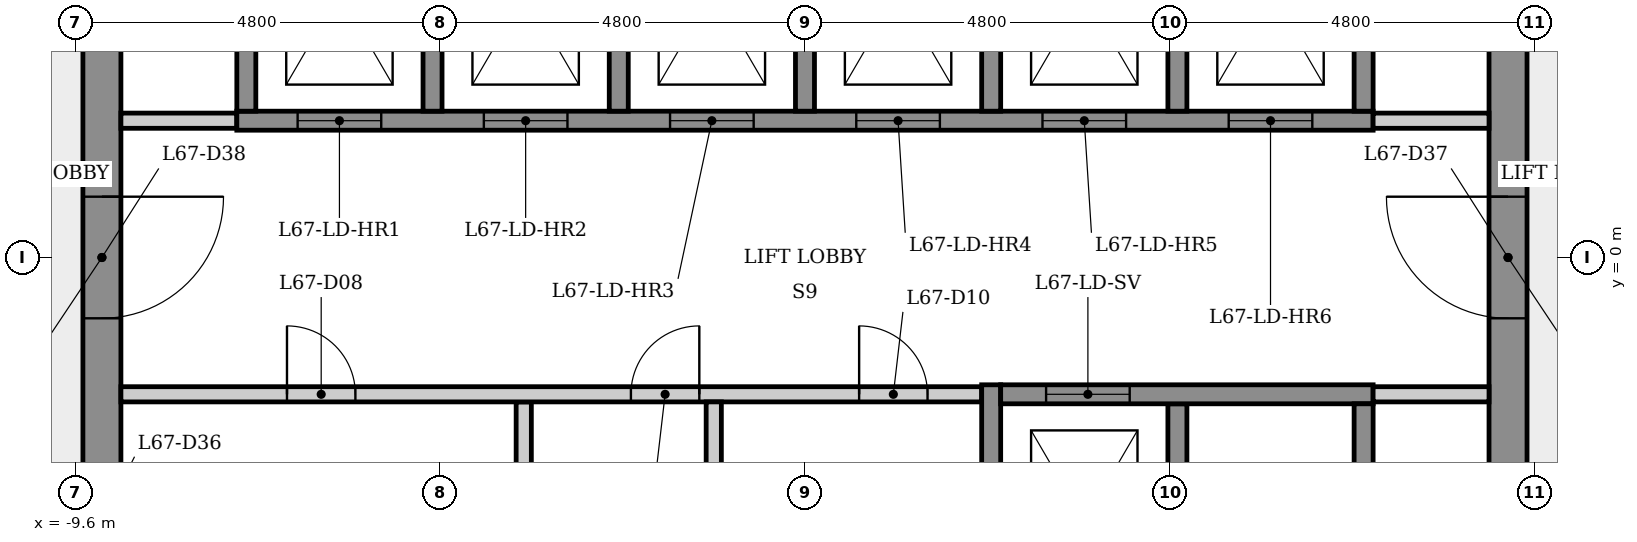
"""IFC4 building model, lengths in metres.
Left out: names, types, materials, properties, quantities, classifications, styles, units other than length and angle.
Written with IfcOpenShell. Run it as: python <this file> out.ifc"""

import sys

from ifc_helpers import new_model, si_unit, direction, frame, frame_2d, origin, place, context, subcontext, project, spatial, rectangle, extrude, element, fill, save


model = new_model("IFC4")
c1 = context("Model", 3, precision=1e-05, world=origin(), true_north=direction((0.0, 1.0)))
c2 = subcontext(c1, "Body", "Model", "MODEL_VIEW")
j1 = project(units=[si_unit("LENGTHUNIT", "METRE"), si_unit("PLANEANGLEUNIT", "RADIAN")], contexts=[c1])
p1 = place(None, origin())
s1 = spatial("IfcSite", under=j1, at=p1, CompositionType="ELEMENT")
p2 = place(p1, origin())
s2 = spatial("IfcBuilding", under=s1, at=p2, CompositionType="ELEMENT")
p3 = place(p2, frame((0.0, 0.0, 249.5)))
s3 = spatial("IfcBuildingStorey", under=s2, at=p3, CompositionType="ELEMENT", Elevation=249.5)
p4 = place(p3, frame((9.25, -5.485, 0.0), z_axis=(0.0, 0.0, 1.0), x_axis=(0.0, 1.0, 0.0)))
e1 = element("IfcWall", 1, at=p4, inside=s3, PredefinedType="SHEAR", context=c2, shape_type="SweptSolid", body=[
    extrude(rectangle(XDim=10.97, YDim=0.5, at=frame_2d((5.485, 0.0))), origin(), (0.0, 0.0, 1.0), 3.4),
])
p5 = place(p4, frame((4.685, 0.0, 0.0)))
e2 = element("IfcOpeningElement", 2, at=p5, cuts=e1, PredefinedType="OPENING", context=c2, shape_type="SweptSolid", body=[
    extrude(rectangle(XDim=1.6, YDim=2.1, at=frame_2d((0.8, 1.05))), frame((0.0, 0.26, 0.0), z_axis=(0.0, -1.0, 0.0), x_axis=(1.0, 0.0, 0.0)), (0.0, 0.0, 1.0), 0.52),
])
p6 = place(p3, frame((-9.25, 5.485, 0.0), z_axis=(0.0, 0.0, 1.0), x_axis=(0.0, -1.0, 0.0)))
e3 = element("IfcWall", 3, at=p6, inside=s3, PredefinedType="SHEAR", context=c2, shape_type="SweptSolid", body=[
    extrude(rectangle(XDim=10.97, YDim=0.5, at=frame_2d((5.485, 0.0))), origin(), (0.0, 0.0, 1.0), 3.4),
])
p7 = place(p6, frame((8.51, 0.0, 0.0)))
e4 = element("IfcOpeningElement", 4, at=p7, cuts=e3, PredefinedType="OPENING", context=c2, shape_type="SweptSolid", body=[
    extrude(rectangle(XDim=0.9, YDim=2.1, at=frame_2d((0.45, 1.05))), frame((0.0, 0.26, 0.0), z_axis=(0.0, -1.0, 0.0), x_axis=(1.0, 0.0, 0.0)), (0.0, 0.0, 1.0), 0.52),
])
p8 = place(p6, frame((4.685, 0.0, 0.0)))
e5 = element("IfcOpeningElement", 5, at=p8, cuts=e3, PredefinedType="OPENING", context=c2, shape_type="SweptSolid", body=[
    extrude(rectangle(XDim=1.6, YDim=2.1, at=frame_2d((0.8, 1.05))), frame((0.0, 0.26, 0.0), z_axis=(0.0, -1.0, 0.0), x_axis=(1.0, 0.0, 0.0)), (0.0, 0.0, 1.0), 0.52),
])
p9 = place(p3, frame((-9.0, 1.8, 0.0), z_axis=(0.0, 0.0, 1.0), x_axis=(1.0, 0.0, 0.0)))
e6 = element("IfcWall", 6, at=p9, inside=s3, PredefinedType="PARTITIONING", context=c2, shape_type="SweptSolid", body=[
    extrude(rectangle(XDim=1.525, YDim=0.2, at=frame_2d((0.763, 0.0))), origin(), (0.0, 0.0, 1.0), 3.0),
])
p10 = place(p3, frame((-7.475, 1.8, 0.0), z_axis=(0.0, 0.0, 1.0), x_axis=(1.0, 0.0, 0.0)))
e7 = element("IfcWall", 7, at=p10, inside=s3, PredefinedType="SHEAR", context=c2, shape_type="SweptSolid", body=[
    extrude(rectangle(XDim=14.95, YDim=0.25, at=frame_2d((7.475, 0.0))), origin(), (0.0, 0.0, 1.0), 3.0),
])
p11 = place(p10, frame((0.8, 0.0, 0.0)))
e8 = element("IfcOpeningElement", 8, at=p11, cuts=e7, PredefinedType="OPENING", context=c2, shape_type="SweptSolid", body=[
    extrude(rectangle(XDim=1.1, YDim=2.1, at=frame_2d((0.55, 1.05))), frame((0.0, 0.135, 0.0), z_axis=(0.0, -1.0, 0.0), x_axis=(1.0, 0.0, 0.0)), (0.0, 0.0, 1.0), 0.27),
])
p12 = place(p10, frame((3.25, 0.0, 0.0)))
e9 = element("IfcOpeningElement", 9, at=p12, cuts=e7, PredefinedType="OPENING", context=c2, shape_type="SweptSolid", body=[
    extrude(rectangle(XDim=1.1, YDim=2.1, at=frame_2d((0.55, 1.05))), frame((0.0, 0.135, 0.0), z_axis=(0.0, -1.0, 0.0), x_axis=(1.0, 0.0, 0.0)), (0.0, 0.0, 1.0), 0.27),
])
p13 = place(p10, frame((5.7, 0.0, 0.0)))
e10 = element("IfcOpeningElement", 10, at=p13, cuts=e7, PredefinedType="OPENING", context=c2, shape_type="SweptSolid", body=[
    extrude(rectangle(XDim=1.1, YDim=2.1, at=frame_2d((0.55, 1.05))), frame((0.0, 0.135, 0.0), z_axis=(0.0, -1.0, 0.0), x_axis=(1.0, 0.0, 0.0)), (0.0, 0.0, 1.0), 0.27),
])
p14 = place(p10, frame((8.15, 0.0, 0.0)))
e11 = element("IfcOpeningElement", 11, at=p14, cuts=e7, PredefinedType="OPENING", context=c2, shape_type="SweptSolid", body=[
    extrude(rectangle(XDim=1.1, YDim=2.1, at=frame_2d((0.55, 1.05))), frame((0.0, 0.135, 0.0), z_axis=(0.0, -1.0, 0.0), x_axis=(1.0, 0.0, 0.0)), (0.0, 0.0, 1.0), 0.27),
])
p15 = place(p10, frame((10.6, 0.0, 0.0)))
e12 = element("IfcOpeningElement", 12, at=p15, cuts=e7, PredefinedType="OPENING", context=c2, shape_type="SweptSolid", body=[
    extrude(rectangle(XDim=1.1, YDim=2.1, at=frame_2d((0.55, 1.05))), frame((0.0, 0.135, 0.0), z_axis=(0.0, -1.0, 0.0), x_axis=(1.0, 0.0, 0.0)), (0.0, 0.0, 1.0), 0.27),
])
p16 = place(p10, frame((13.05, 0.0, 0.0)))
e13 = element("IfcOpeningElement", 13, at=p16, cuts=e7, PredefinedType="OPENING", context=c2, shape_type="SweptSolid", body=[
    extrude(rectangle(XDim=1.1, YDim=2.1, at=frame_2d((0.55, 1.05))), frame((0.0, 0.135, 0.0), z_axis=(0.0, -1.0, 0.0), x_axis=(1.0, 0.0, 0.0)), (0.0, 0.0, 1.0), 0.27),
])
p17 = place(p3, frame((-7.35, 1.925, 0.0), z_axis=(0.0, 0.0, 1.0), x_axis=(0.0, 1.0, 0.0)))
e14 = element("IfcWall", 14, at=p17, inside=s3, PredefinedType="SHEAR", context=c2, shape_type="SweptSolid", body=[
    extrude(rectangle(XDim=3.35, YDim=0.25, at=frame_2d((1.675, 0.0))), origin(), (0.0, 0.0, 1.0), 3.0),
])
p18 = place(p3, frame((-4.9, 5.025, 0.0), z_axis=(0.0, 0.0, 1.0), x_axis=(0.0, -1.0, 0.0)))
e15 = element("IfcWall", 15, at=p18, inside=s3, PredefinedType="SHEAR", context=c2, shape_type="SweptSolid", body=[
    extrude(rectangle(XDim=3.1, YDim=0.25, at=frame_2d((1.55, 0.0))), origin(), (0.0, 0.0, 1.0), 3.4),
])
p19 = place(p3, frame((-3.7, -1.9, 0.0), z_axis=(0.0, 0.0, 1.0), x_axis=(0.0, -1.0, 0.0)))
e16 = element("IfcWall", 16, at=p19, inside=s3, PredefinedType="PARTITIONING", context=c2, shape_type="SweptSolid", body=[
    extrude(rectangle(XDim=3.15, YDim=0.2, at=frame_2d((1.575, 0.0))), origin(), (0.0, 0.0, 1.0), 3.0),
])
p20 = place(p3, frame((-9.0, -1.8, 0.0), z_axis=(0.0, 0.0, 1.0), x_axis=(1.0, 0.0, 0.0)))
e17 = element("IfcWall", 17, at=p20, inside=s3, PredefinedType="PARTITIONING", context=c2, shape_type="SweptSolid", body=[
    extrude(rectangle(XDim=11.325, YDim=0.2, at=frame_2d((5.663, 0.0))), origin(), (0.0, 0.0, 1.0), 3.0),
])
p21 = place(p20, frame((2.185, 0.0, 0.0)))
e18 = element("IfcOpeningElement", 18, at=p21, cuts=e17, PredefinedType="OPENING", context=c2, shape_type="SweptSolid", body=[
    extrude(rectangle(XDim=0.9, YDim=2.1, at=frame_2d((0.45, 1.05))), frame((0.0, 0.11, 0.0), z_axis=(0.0, -1.0, 0.0), x_axis=(1.0, 0.0, 0.0)), (0.0, 0.0, 1.0), 0.22),
])
p22 = place(p20, frame((6.71, 0.0, 0.0)))
e19 = element("IfcOpeningElement", 19, at=p22, cuts=e17, PredefinedType="OPENING", context=c2, shape_type="SweptSolid", body=[
    extrude(rectangle(XDim=0.9, YDim=2.1, at=frame_2d((0.45, 1.05))), frame((0.0, 0.11, 0.0), z_axis=(0.0, -1.0, 0.0), x_axis=(1.0, 0.0, 0.0)), (0.0, 0.0, 1.0), 0.22),
])
p23 = place(p20, frame((9.713, 0.0, 0.0)))
e20 = element("IfcOpeningElement", 20, at=p23, cuts=e17, PredefinedType="OPENING", context=c2, shape_type="SweptSolid", body=[
    extrude(rectangle(XDim=0.9, YDim=2.1, at=frame_2d((0.45, 1.05))), frame((0.0, 0.11, 0.0), z_axis=(0.0, -1.0, 0.0), x_axis=(1.0, 0.0, 0.0)), (0.0, 0.0, 1.0), 0.22),
])
p24 = place(p3, frame((-2.45, 5.025, 0.0), z_axis=(0.0, 0.0, 1.0), x_axis=(0.0, -1.0, 0.0)))
e21 = element("IfcWall", 21, at=p24, inside=s3, PredefinedType="SHEAR", context=c2, shape_type="SweptSolid", body=[
    extrude(rectangle(XDim=3.1, YDim=0.25, at=frame_2d((1.55, 0.0))), origin(), (0.0, 0.0, 1.0), 3.4),
])
p25 = place(p3, frame((-1.2, -1.9, 0.0), z_axis=(0.0, 0.0, 1.0), x_axis=(0.0, -1.0, 0.0)))
e22 = element("IfcWall", 22, at=p25, inside=s3, PredefinedType="PARTITIONING", context=c2, shape_type="SweptSolid", body=[
    extrude(rectangle(XDim=3.15, YDim=0.2, at=frame_2d((1.575, 0.0))), origin(), (0.0, 0.0, 1.0), 3.0),
])
p26 = place(p3, frame((0.0, 5.025, 0.0), z_axis=(0.0, 0.0, 1.0), x_axis=(0.0, -1.0, 0.0)))
e23 = element("IfcWall", 23, at=p26, inside=s3, PredefinedType="SHEAR", context=c2, shape_type="SweptSolid", body=[
    extrude(rectangle(XDim=3.1, YDim=0.25, at=frame_2d((1.55, 0.0))), origin(), (0.0, 0.0, 1.0), 3.4),
])
p27 = place(p3, frame((2.45, -5.275, 0.0), z_axis=(0.0, 0.0, 1.0), x_axis=(0.0, 1.0, 0.0)))
e24 = element("IfcWall", 24, at=p27, inside=s3, PredefinedType="SHEAR", context=c2, shape_type="SweptSolid", body=[
    extrude(rectangle(XDim=3.6, YDim=0.25, at=frame_2d((1.8, 0.0))), origin(), (0.0, 0.0, 1.0), 3.0),
])
for number, where, z_axis, x_axis in (
    (25, (2.45, 5.025, 0.0), (0.0, 0.0, 1.0), (0.0, -1.0, 0.0)),
    (26, (4.9, -1.925, 0.0), (0.0, 0.0, 1.0), (0.0, -1.0, 0.0)),
    (27, (4.9, 5.025, 0.0), (0.0, 0.0, 1.0), (0.0, -1.0, 0.0)),
):
    element("IfcWall", number, at=place(p3, frame(where, z_axis=z_axis, x_axis=x_axis)), inside=s3, PredefinedType="SHEAR", context=c2, shape_type="SweptSolid", body=[
        extrude(rectangle(XDim=3.1, YDim=0.25, at=frame_2d((1.55, 0.0))), origin(), (0.0, 0.0, 1.0), 3.4),
    ])
p28 = place(p3, frame((2.575, -1.8, 0.0), z_axis=(0.0, 0.0, 1.0), x_axis=(1.0, 0.0, 0.0)))
e28 = element("IfcWall", 28, at=p28, inside=s3, PredefinedType="SHEAR", context=c2, shape_type="SweptSolid", body=[
    extrude(rectangle(XDim=4.9, YDim=0.25, at=frame_2d((2.45, 0.0))), origin(), (0.0, 0.0, 1.0), 3.0),
])
p29 = place(p28, frame((0.597, 0.0, 0.0)))
e29 = element("IfcOpeningElement", 29, at=p29, cuts=e28, PredefinedType="OPENING", context=c2, shape_type="SweptSolid", body=[
    extrude(rectangle(XDim=1.1, YDim=2.1, at=frame_2d((0.55, 1.05))), frame((0.0, 0.135, 0.0), z_axis=(0.0, -1.0, 0.0), x_axis=(1.0, 0.0, 0.0)), (0.0, 0.0, 1.0), 0.27),
])
p30 = place(p3, frame((7.475, 1.8, 0.0), z_axis=(0.0, 0.0, 1.0), x_axis=(1.0, 0.0, 0.0)))
e30 = element("IfcWall", 30, at=p30, inside=s3, PredefinedType="PARTITIONING", context=c2, shape_type="SweptSolid", body=[
    extrude(rectangle(XDim=1.525, YDim=0.2, at=frame_2d((0.763, 0.0))), origin(), (0.0, 0.0, 1.0), 3.0),
])
for number, where, z_axis, x_axis in (
    (31, (7.35, -1.925, 0.0), (0.0, 0.0, 1.0), (0.0, -1.0, 0.0)),
    (32, (7.35, 5.025, 0.0), (0.0, 0.0, 1.0), (0.0, -1.0, 0.0)),
):
    element("IfcWall", number, at=place(p3, frame(where, z_axis=z_axis, x_axis=x_axis)), inside=s3, PredefinedType="SHEAR", context=c2, shape_type="SweptSolid", body=[
        extrude(rectangle(XDim=3.1, YDim=0.25, at=frame_2d((1.55, 0.0))), origin(), (0.0, 0.0, 1.0), 3.4),
    ])
p31 = place(p3, frame((9.0, -1.8, 0.0), z_axis=(0.0, 0.0, 1.0), x_axis=(-1.0, 0.0, 0.0)))
e33 = element("IfcWall", 33, at=p31, inside=s3, PredefinedType="PARTITIONING", context=c2, shape_type="SweptSolid", body=[
    extrude(rectangle(XDim=1.525, YDim=0.2, at=frame_2d((0.763, 0.0))), origin(), (0.0, 0.0, 1.0), 3.0),
])
p32 = place(p11, origin())
e34 = element("IfcDoor", 34, at=p32, inside=s3, OperationType="SLIDING_TO_LEFT", PredefinedType="DOOR", context=c2, shape_type="SweptSolid", body=[
    extrude(rectangle(XDim=1.1, YDim=2.1, at=frame_2d((0.55, 1.05))), frame((0.0, 0.025, 0.0), z_axis=(0.0, -1.0, 0.0), x_axis=(1.0, 0.0, 0.0)), (0.0, 0.0, 1.0), 0.05),
])
fill(e8, e34)
p33 = place(p12, origin())
e35 = element("IfcDoor", 35, at=p33, inside=s3, OperationType="SLIDING_TO_LEFT", PredefinedType="DOOR", context=c2, shape_type="SweptSolid", body=[
    extrude(rectangle(XDim=1.1, YDim=2.1, at=frame_2d((0.55, 1.05))), frame((0.0, 0.025, 0.0), z_axis=(0.0, -1.0, 0.0), x_axis=(1.0, 0.0, 0.0)), (0.0, 0.0, 1.0), 0.05),
])
fill(e9, e35)
p34 = place(p13, origin())
e36 = element("IfcDoor", 36, at=p34, inside=s3, OperationType="SLIDING_TO_LEFT", PredefinedType="DOOR", context=c2, shape_type="SweptSolid", body=[
    extrude(rectangle(XDim=1.1, YDim=2.1, at=frame_2d((0.55, 1.05))), frame((0.0, 0.025, 0.0), z_axis=(0.0, -1.0, 0.0), x_axis=(1.0, 0.0, 0.0)), (0.0, 0.0, 1.0), 0.05),
])
fill(e10, e36)
p35 = place(p14, origin())
e37 = element("IfcDoor", 37, at=p35, inside=s3, OperationType="SLIDING_TO_LEFT", PredefinedType="DOOR", context=c2, shape_type="SweptSolid", body=[
    extrude(rectangle(XDim=1.1, YDim=2.1, at=frame_2d((0.55, 1.05))), frame((0.0, 0.025, 0.0), z_axis=(0.0, -1.0, 0.0), x_axis=(1.0, 0.0, 0.0)), (0.0, 0.0, 1.0), 0.05),
])
fill(e11, e37)
p36 = place(p15, origin())
e38 = element("IfcDoor", 38, at=p36, inside=s3, OperationType="SLIDING_TO_LEFT", PredefinedType="DOOR", context=c2, shape_type="SweptSolid", body=[
    extrude(rectangle(XDim=1.1, YDim=2.1, at=frame_2d((0.55, 1.05))), frame((0.0, 0.025, 0.0), z_axis=(0.0, -1.0, 0.0), x_axis=(1.0, 0.0, 0.0)), (0.0, 0.0, 1.0), 0.05),
])
fill(e12, e38)
p37 = place(p16, origin())
e39 = element("IfcDoor", 39, at=p37, inside=s3, OperationType="SLIDING_TO_LEFT", PredefinedType="DOOR", context=c2, shape_type="SweptSolid", body=[
    extrude(rectangle(XDim=1.1, YDim=2.1, at=frame_2d((0.55, 1.05))), frame((0.0, 0.025, 0.0), z_axis=(0.0, -1.0, 0.0), x_axis=(1.0, 0.0, 0.0)), (0.0, 0.0, 1.0), 0.05),
])
fill(e13, e39)
p38 = place(p29, origin())
e40 = element("IfcDoor", 40, at=p38, inside=s3, OperationType="SLIDING_TO_LEFT", PredefinedType="DOOR", context=c2, shape_type="SweptSolid", body=[
    extrude(rectangle(XDim=1.1, YDim=2.1, at=frame_2d((0.55, 1.05))), frame((0.0, 0.025, 0.0), z_axis=(0.0, -1.0, 0.0), x_axis=(1.0, 0.0, 0.0)), (0.0, 0.0, 1.0), 0.05),
])
fill(e29, e40)
p39 = place(p21, origin())
e41 = element("IfcDoor", 41, at=p39, inside=s3, OperationType="SINGLE_SWING_LEFT", PredefinedType="DOOR", context=c2, shape_type="SweptSolid", body=[
    extrude(rectangle(XDim=0.9, YDim=2.1, at=frame_2d((0.45, 1.05))), frame((0.0, 0.025, 0.0), z_axis=(0.0, -1.0, 0.0), x_axis=(1.0, 0.0, 0.0)), (0.0, 0.0, 1.0), 0.05),
])
fill(e18, e41)
p40 = place(p22, origin())
e42 = element("IfcDoor", 42, at=p40, inside=s3, OperationType="SINGLE_SWING_RIGHT", PredefinedType="DOOR", context=c2, shape_type="SweptSolid", body=[
    extrude(rectangle(XDim=0.9, YDim=2.1, at=frame_2d((0.45, 1.05))), frame((0.0, 0.025, 0.0), z_axis=(0.0, -1.0, 0.0), x_axis=(1.0, 0.0, 0.0)), (0.0, 0.0, 1.0), 0.05),
])
fill(e19, e42)
p41 = place(p23, origin())
e43 = element("IfcDoor", 43, at=p41, inside=s3, OperationType="SINGLE_SWING_LEFT", PredefinedType="DOOR", context=c2, shape_type="SweptSolid", body=[
    extrude(rectangle(XDim=0.9, YDim=2.1, at=frame_2d((0.45, 1.05))), frame((0.0, 0.025, 0.0), z_axis=(0.0, -1.0, 0.0), x_axis=(1.0, 0.0, 0.0)), (0.0, 0.0, 1.0), 0.05),
])
fill(e20, e43)
p42 = place(p5, origin())
e44 = element("IfcDoor", 44, at=p42, inside=s3, OperationType="SINGLE_SWING_RIGHT", PredefinedType="DOOR", context=c2, shape_type="SweptSolid", body=[
    extrude(rectangle(XDim=1.6, YDim=2.1, at=frame_2d((0.8, 1.05))), frame((0.0, 0.025, 0.0), z_axis=(0.0, -1.0, 0.0), x_axis=(1.0, 0.0, 0.0)), (0.0, 0.0, 1.0), 0.05),
])
fill(e2, e44)
p43 = place(p8, origin())
e45 = element("IfcDoor", 45, at=p43, inside=s3, OperationType="SINGLE_SWING_LEFT", PredefinedType="DOOR", context=c2, shape_type="SweptSolid", body=[
    extrude(rectangle(XDim=1.6, YDim=2.1, at=frame_2d((0.8, 1.05))), frame((0.0, 0.025, 0.0), z_axis=(0.0, -1.0, 0.0), x_axis=(1.0, 0.0, 0.0)), (0.0, 0.0, 1.0), 0.05),
])
fill(e5, e45)
save(model, sys.argv[1])
